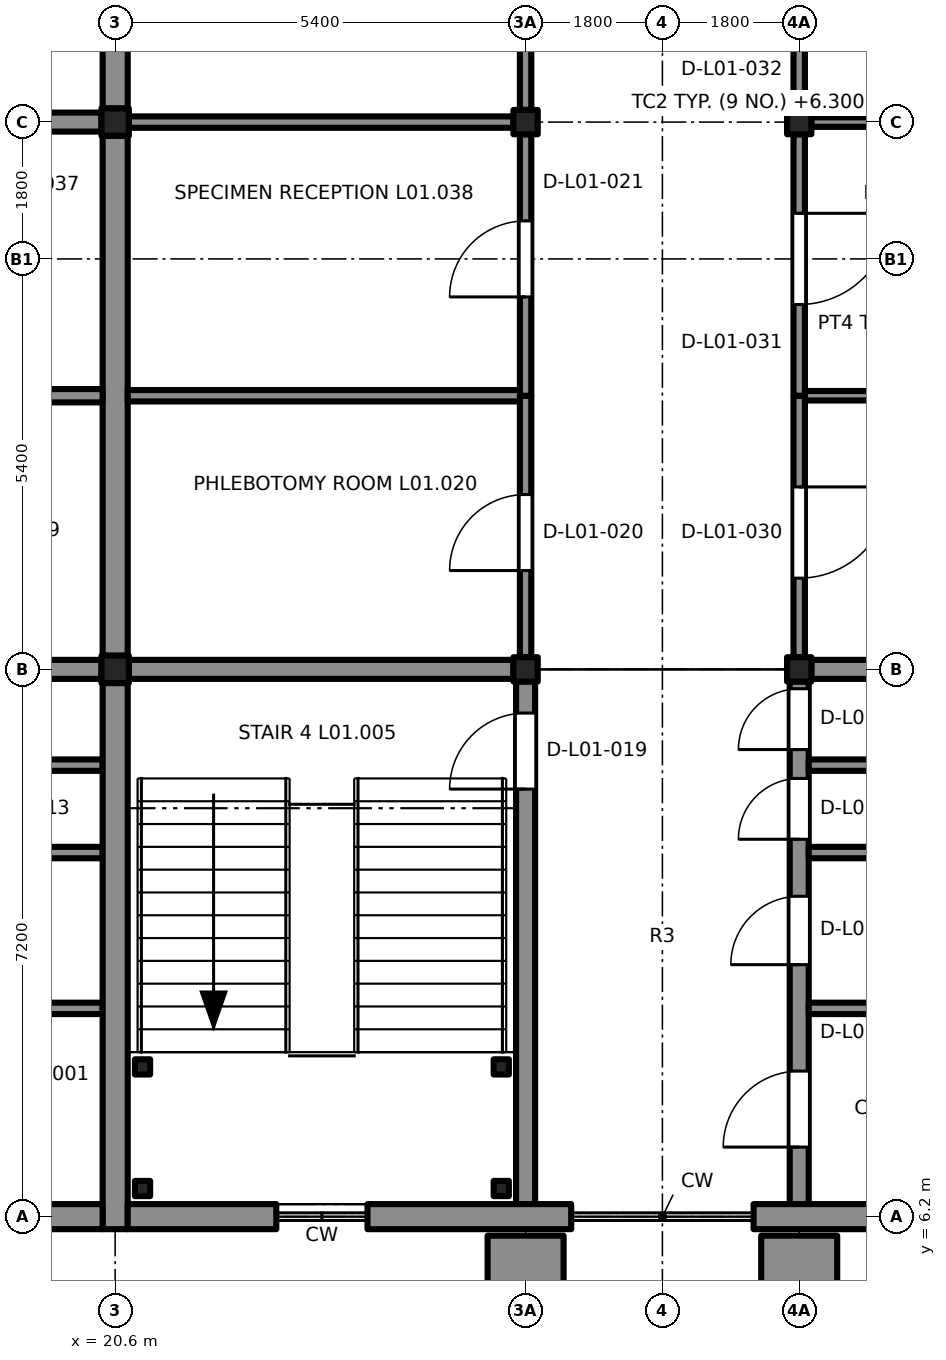
"""IFC4 building model, lengths in metres.
Left out: names, types, materials, properties, quantities, classifications, styles, units other than length and angle.
Written with IfcOpenShell. Run it as: python <this file> out.ifc"""

import sys

from ifc_helpers import new_model, si_unit, direction, frame, frame_2d, origin, origin_2d, place, context, subcontext, project, spatial, rectangle, extrude, element, fill, save


model = new_model("IFC4")
c1 = context("Model", 3, precision=1e-05, world=origin(), true_north=direction((0.0, 1.0)))
c2 = subcontext(c1, "Body", "Model", "MODEL_VIEW")
j1 = project(units=[si_unit("LENGTHUNIT", "METRE"), si_unit("PLANEANGLEUNIT", "RADIAN")], contexts=[c1])
p1 = place(None, origin())
s1 = spatial("IfcSite", under=j1, at=p1, CompositionType="ELEMENT")
p2 = place(p1, origin())
s2 = spatial("IfcBuilding", under=s1, at=p2, CompositionType="ELEMENT")
p3 = place(p2, frame((0.0, 0.0, 6.3)))
s3 = spatial("IfcBuildingStorey", under=s2, at=p3, CompositionType="ELEMENT", Elevation=6.3)
for number, where, z_axis, x_axis in (
    (1, (20.6, 13.4, 0.0), (0.0, 0.0, 1.0), (1.0, 0.0, 0.0)),
    (2, (20.6, 20.6, 0.0), (0.0, 0.0, 1.0), (1.0, 0.0, 0.0)),
):
    element("IfcColumn", number, at=place(p3, frame(where, z_axis=z_axis, x_axis=x_axis)), inside=s3, PredefinedType="COLUMN", context=c2, shape_type="SweptSolid", body=[
        extrude(rectangle(XDim=0.36, YDim=0.36, at=origin_2d()), origin(), (0.0, 0.0, 1.0), 3.9),
    ])
for number, where, z_axis, x_axis in (
    (3, (26.0, 13.4, 0.0), (0.0, 0.0, 1.0), (1.0, 0.0, 0.0)),
    (4, (29.6, 13.4, 0.0), (0.0, 0.0, 1.0), (1.0, 0.0, 0.0)),
    (5, (26.0, 20.6, 0.0), (0.0, 0.0, 1.0), (1.0, 0.0, 0.0)),
    (6, (29.6, 20.6, 0.0), (0.0, 0.0, 1.0), (1.0, 0.0, 0.0)),
):
    element("IfcColumn", number, at=place(p3, frame(where, z_axis=z_axis, x_axis=x_axis)), inside=s3, PredefinedType="COLUMN", context=c2, shape_type="SweptSolid", body=[
        extrude(rectangle(XDim=0.32, YDim=0.32, at=origin_2d()), origin(), (0.0, 0.0, 1.0), 3.9),
    ])
p4 = place(p3, frame((15.38, 13.4, 0.0), z_axis=(0.0, 0.0, 1.0), x_axis=(1.0, 0.0, 0.0)))
e7 = element("IfcWall", 7, at=p4, inside=s3, PredefinedType="SHEAR", context=c2, shape_type="SweptSolid", body=[
    extrude(rectangle(XDim=5.04, YDim=0.25, at=frame_2d((2.52, 0.0))), origin(), (0.0, 0.0, 1.0), 3.65),
])
for number, where, z_axis, x_axis in (
    (8, (15.325, 8.94, 0.0), (0.0, 0.0, 1.0), (1.0, 0.0, 0.0)),
    (9, (15.325, 10.99, 0.0), (0.0, 0.0, 1.0), (1.0, 0.0, 0.0)),
    (10, (15.325, 12.14, 0.0), (0.0, 0.0, 1.0), (1.0, 0.0, 0.0)),
):
    element("IfcWall", number, at=place(p3, frame(where, z_axis=z_axis, x_axis=x_axis)), inside=s3, PredefinedType="PARTITIONING", context=c2, shape_type="SweptSolid", body=[
        extrude(rectangle(XDim=5.11, YDim=0.15, at=frame_2d((2.555, 0.0))), origin(), (0.0, 0.0, 1.0), 3.65),
    ])
p5 = place(p3, frame((15.38, 20.6, 0.0), z_axis=(0.0, 0.0, 1.0), x_axis=(1.0, 0.0, 0.0)))
e11 = element("IfcWall", 11, at=p5, inside=s3, PredefinedType="SHEAR", context=c2, shape_type="SweptSolid", body=[
    extrude(rectangle(XDim=5.04, YDim=0.25, at=frame_2d((2.52, 0.0))), origin(), (0.0, 0.0, 1.0), 3.65),
])
p6 = place(p3, frame((26.0, 6.365, 0.0), z_axis=(0.0, 0.0, 1.0), x_axis=(0.0, 1.0, 0.0)))
e12 = element("IfcWall", 12, at=p6, inside=s3, PredefinedType="SHEAR", context=c2, shape_type="SweptSolid", body=[
    extrude(rectangle(XDim=6.875, YDim=0.25, at=frame_2d((3.438, 0.0))), origin(), (0.0, 0.0, 1.0), 3.65),
])
p7 = place(p6, frame((5.46, 0.0, 0.0)))
e13 = element("IfcOpeningElement", 13, at=p7, cuts=e12, PredefinedType="OPENING", context=c2, shape_type="SweptSolid", body=[
    extrude(rectangle(XDim=1.0, YDim=2.1, at=frame_2d((0.5, 1.05))), frame((0.0, 0.135, 0.0), z_axis=(0.0, -1.0, 0.0), x_axis=(1.0, 0.0, 0.0)), (0.0, 0.0, 1.0), 0.27),
])
p8 = place(p3, frame((20.78, 13.4, 0.0), z_axis=(0.0, 0.0, 1.0), x_axis=(1.0, 0.0, 0.0)))
e14 = element("IfcWall", 14, at=p8, inside=s3, PredefinedType="SHEAR", context=c2, shape_type="SweptSolid", body=[
    extrude(rectangle(XDim=5.06, YDim=0.25, at=frame_2d((2.53, 0.0))), origin(), (0.0, 0.0, 1.0), 3.65),
])
p9 = place(p3, frame((29.6, 6.365, 0.0), z_axis=(0.0, 0.0, 1.0), x_axis=(0.0, 1.0, 0.0)))
e15 = element("IfcWall", 15, at=p9, inside=s3, PredefinedType="SHEAR", context=c2, shape_type="SweptSolid", body=[
    extrude(rectangle(XDim=6.875, YDim=0.25, at=frame_2d((3.438, 0.0))), origin(), (0.0, 0.0, 1.0), 3.65),
])
p10 = place(p9, frame((0.75, 0.0, 0.0)))
e16 = element("IfcOpeningElement", 16, at=p10, cuts=e15, PredefinedType="OPENING", context=c2, shape_type="SweptSolid", body=[
    extrude(rectangle(XDim=1.0, YDim=2.1, at=frame_2d((0.5, 1.05))), frame((0.0, 0.135, 0.0), z_axis=(0.0, -1.0, 0.0), x_axis=(1.0, 0.0, 0.0)), (0.0, 0.0, 1.0), 0.27),
])
p11 = place(p9, frame((3.15, 0.0, 0.0)))
e17 = element("IfcOpeningElement", 17, at=p11, cuts=e15, PredefinedType="OPENING", context=c2, shape_type="SweptSolid", body=[
    extrude(rectangle(XDim=0.9, YDim=2.1, at=frame_2d((0.45, 1.05))), frame((0.0, 0.135, 0.0), z_axis=(0.0, -1.0, 0.0), x_axis=(1.0, 0.0, 0.0)), (0.0, 0.0, 1.0), 0.27),
])
p12 = place(p9, frame((4.8, 0.0, 0.0)))
e18 = element("IfcOpeningElement", 18, at=p12, cuts=e15, PredefinedType="OPENING", context=c2, shape_type="SweptSolid", body=[
    extrude(rectangle(XDim=0.8, YDim=2.1, at=frame_2d((0.4, 1.05))), frame((0.0, 0.135, 0.0), z_axis=(0.0, -1.0, 0.0), x_axis=(1.0, 0.0, 0.0)), (0.0, 0.0, 1.0), 0.27),
])
p13 = place(p9, frame((5.98, 0.0, 0.0)))
e19 = element("IfcOpeningElement", 19, at=p13, cuts=e15, PredefinedType="OPENING", context=c2, shape_type="SweptSolid", body=[
    extrude(rectangle(XDim=0.8, YDim=2.1, at=frame_2d((0.4, 1.05))), frame((0.0, 0.135, 0.0), z_axis=(0.0, -1.0, 0.0), x_axis=(1.0, 0.0, 0.0)), (0.0, 0.0, 1.0), 0.27),
])
p14 = place(p3, frame((29.76, 13.4, 0.0), z_axis=(0.0, 0.0, 1.0), x_axis=(1.0, 0.0, 0.0)))
e20 = element("IfcWall", 20, at=p14, inside=s3, PredefinedType="SHEAR", context=c2, shape_type="SweptSolid", body=[
    extrude(rectangle(XDim=5.08, YDim=0.25, at=frame_2d((2.54, 0.0))), origin(), (0.0, 0.0, 1.0), 3.65),
])
for number, where, z_axis, x_axis in (
    (21, (29.725, 8.94, 0.0), (0.0, 0.0, 1.0), (1.0, 0.0, 0.0)),
    (22, (29.725, 10.99, 0.0), (0.0, 0.0, 1.0), (1.0, 0.0, 0.0)),
    (23, (29.725, 12.14, 0.0), (0.0, 0.0, 1.0), (1.0, 0.0, 0.0)),
):
    element("IfcWall", number, at=place(p3, frame(where, z_axis=z_axis, x_axis=x_axis)), inside=s3, PredefinedType="PARTITIONING", context=c2, shape_type="SweptSolid", body=[
        extrude(rectangle(XDim=5.11, YDim=0.15, at=frame_2d((2.555, 0.0))), origin(), (0.0, 0.0, 1.0), 3.65),
    ])
for number, where, z_axis, x_axis in (
    (24, (20.96, 6.57, 0.0), (0.0, 0.0, 1.0), (1.0, 0.0, 0.0)),
    (25, (25.68, 6.57, 0.0), (0.0, 0.0, 1.0), (1.0, 0.0, 0.0)),
    (26, (20.96, 8.17, 0.0), (0.0, 0.0, 1.0), (1.0, 0.0, 0.0)),
    (27, (25.68, 8.17, 0.0), (0.0, 0.0, 1.0), (1.0, 0.0, 0.0)),
):
    element("IfcColumn", number, at=place(p3, frame(where, z_axis=z_axis, x_axis=x_axis)), inside=s3, PredefinedType="COLUMN", context=c2, shape_type="SweptSolid", body=[
        extrude(rectangle(XDim=0.2, YDim=0.2, at=origin_2d()), origin(), (0.0, 0.0, 1.0), 3.9),
    ])
p15 = place(p3, frame((20.6, 13.22, 0.0), z_axis=(0.0, 0.0, 1.0), x_axis=(0.0, -1.0, 0.0)))
e28 = element("IfcWall", 28, at=p15, inside=s3, PredefinedType="SOLIDWALL", context=c2, shape_type="SweptSolid", body=[
    extrude(rectangle(XDim=7.185, YDim=0.33, at=frame_2d((3.593, 0.0))), origin(), (0.0, 0.0, 1.0), 3.22),
])
p16 = place(p3, frame((20.6, 20.42, 0.0), z_axis=(0.0, 0.0, 1.0), x_axis=(0.0, -1.0, 0.0)))
e29 = element("IfcWall", 29, at=p16, inside=s3, PredefinedType="SOLIDWALL", context=c2, shape_type="SweptSolid", body=[
    extrude(rectangle(XDim=6.84, YDim=0.33, at=frame_2d((3.42, 0.0))), origin(), (0.0, 0.0, 1.0), 3.22),
])
p17 = place(p3, frame((20.6, 27.62, 0.0), z_axis=(0.0, 0.0, 1.0), x_axis=(0.0, -1.0, 0.0)))
e30 = element("IfcWall", 30, at=p17, inside=s3, PredefinedType="SOLIDWALL", context=c2, shape_type="SweptSolid", body=[
    extrude(rectangle(XDim=6.84, YDim=0.33, at=frame_2d((3.42, 0.0))), origin(), (0.0, 0.0, 1.0), 3.22),
])
p18 = place(p3, frame((20.435, 6.2, 0.0), z_axis=(0.0, 0.0, 1.0), x_axis=(-1.0, 0.0, 0.0)))
e31 = element("IfcWall", 31, at=p18, inside=s3, PredefinedType="SOLIDWALL", context=c2, shape_type="SweptSolid", body=[
    extrude(rectangle(XDim=5.835, YDim=0.33, at=frame_2d((2.917, 0.0))), origin(), (0.0, 0.0, 1.0), 3.2),
])
p19 = place(p3, frame((22.72, 6.2, 0.0), z_axis=(0.0, 0.0, 1.0), x_axis=(-1.0, 0.0, 0.0)))
e32 = element("IfcWall", 32, at=p19, inside=s3, PredefinedType="SOLIDWALL", context=c2, shape_type="SweptSolid", body=[
    extrude(rectangle(XDim=1.955, YDim=0.33, at=frame_2d((0.978, 0.0))), origin(), (0.0, 0.0, 1.0), 3.2),
])
p20 = place(p3, frame((26.6, 6.2, 0.0), z_axis=(0.0, 0.0, 1.0), x_axis=(-1.0, 0.0, 0.0)))
e33 = element("IfcWall", 33, at=p20, inside=s3, PredefinedType="SOLIDWALL", context=c2, shape_type="SweptSolid", body=[
    extrude(rectangle(XDim=2.68, YDim=0.33, at=frame_2d((1.34, 0.0))), origin(), (0.0, 0.0, 1.0), 3.2),
])
p21 = place(p3, frame((33.469, 6.2, 0.0), z_axis=(0.0, 0.0, 1.0), x_axis=(-1.0, 0.0, 0.0)))
e34 = element("IfcWall", 34, at=p21, inside=s3, PredefinedType="SOLIDWALL", context=c2, shape_type="SweptSolid", body=[
    extrude(rectangle(XDim=4.469, YDim=0.33, at=frame_2d((2.234, 0.0))), origin(), (0.0, 0.0, 1.0), 3.2),
])
for number, where, z_axis, x_axis in (
    (35, (26.5, 5.575, 0.0), (0.0, 0.0, 1.0), (-1.0, 0.0, 0.0)),
    (36, (30.1, 5.575, 0.0), (0.0, 0.0, 1.0), (-1.0, 0.0, 0.0)),
):
    element("IfcWall", number, at=place(p3, frame(where, z_axis=z_axis, x_axis=x_axis)), inside=s3, PredefinedType="SOLIDWALL", context=c2, shape_type="SweptSolid", body=[
        extrude(rectangle(XDim=1.0, YDim=0.75, at=frame_2d((0.5, 0.0))), origin(), (0.0, 0.0, 1.0), 3.9),
    ])
p22 = place(p3, frame((20.435, 17.0, 0.0), z_axis=(0.0, 0.0, 1.0), x_axis=(-1.0, 0.0, 0.0)))
e37 = element("IfcWall", 37, at=p22, inside=s3, PredefinedType="PARTITIONING", context=c2, shape_type="SweptSolid", body=[
    extrude(rectangle(XDim=5.147, YDim=0.175, at=frame_2d((2.574, 0.0))), origin(), (0.0, 0.0, 1.0), 3.38),
])
p23 = place(p3, frame((26.0, 13.56, 0.0), z_axis=(0.0, 0.0, 1.0), x_axis=(0.0, 1.0, 0.0)))
e38 = element("IfcWall", 38, at=p23, inside=s3, PredefinedType="PARTITIONING", context=c2, shape_type="SweptSolid", body=[
    extrude(rectangle(XDim=3.44, YDim=0.15, at=frame_2d((1.72, 0.0))), origin(), (0.0, 0.0, 1.0), 3.22),
])
p24 = place(p23, frame((1.14, 0.0, 0.0)))
e39 = element("IfcOpeningElement", 39, at=p24, cuts=e38, PredefinedType="OPENING", context=c2, shape_type="SweptSolid", body=[
    extrude(rectangle(XDim=1.0, YDim=2.1, at=frame_2d((0.5, 1.05))), frame((0.0, 0.085, 0.0), z_axis=(0.0, -1.0, 0.0), x_axis=(1.0, 0.0, 0.0)), (0.0, 0.0, 1.0), 0.17),
])
p25 = place(p3, frame((26.0, 17.0, 0.0), z_axis=(0.0, 0.0, 1.0), x_axis=(0.0, 1.0, 0.0)))
e40 = element("IfcWall", 40, at=p25, inside=s3, PredefinedType="PARTITIONING", context=c2, shape_type="SweptSolid", body=[
    extrude(rectangle(XDim=3.44, YDim=0.15, at=frame_2d((1.72, 0.0))), origin(), (0.0, 0.0, 1.0), 3.22),
])
p26 = place(p25, frame((1.3, 0.0, 0.0)))
e41 = element("IfcOpeningElement", 41, at=p26, cuts=e40, PredefinedType="OPENING", context=c2, shape_type="SweptSolid", body=[
    extrude(rectangle(XDim=1.0, YDim=2.1, at=frame_2d((0.5, 1.05))), frame((0.0, 0.085, 0.0), z_axis=(0.0, -1.0, 0.0), x_axis=(1.0, 0.0, 0.0)), (0.0, 0.0, 1.0), 0.17),
])
p27 = place(p3, frame((20.765, 17.0, 0.0), z_axis=(0.0, 0.0, 1.0), x_axis=(1.0, 0.0, 0.0)))
e42 = element("IfcWall", 42, at=p27, inside=s3, PredefinedType="PARTITIONING", context=c2, shape_type="SweptSolid", body=[
    extrude(rectangle(XDim=5.16, YDim=0.15, at=frame_2d((2.58, 0.0))), origin(), (0.0, 0.0, 1.0), 3.38),
])
p28 = place(p3, frame((26.0, 20.76, 0.0), z_axis=(0.0, 0.0, 1.0), x_axis=(0.0, 1.0, 0.0)))
e43 = element("IfcWall", 43, at=p28, inside=s3, PredefinedType="PARTITIONING", context=c2, shape_type="SweptSolid", body=[
    extrude(rectangle(XDim=6.88, YDim=0.15, at=frame_2d((3.44, 0.0))), origin(), (0.0, 0.0, 1.0), 3.22),
])
p29 = place(p28, frame((1.14, 0.0, 0.0)))
e44 = element("IfcOpeningElement", 44, at=p29, cuts=e43, PredefinedType="OPENING", context=c2, shape_type="SweptSolid", body=[
    extrude(rectangle(XDim=1.0, YDim=2.1, at=frame_2d((0.5, 1.05))), frame((0.0, 0.085, 0.0), z_axis=(0.0, -1.0, 0.0), x_axis=(1.0, 0.0, 0.0)), (0.0, 0.0, 1.0), 0.17),
])
p30 = place(p3, frame((20.78, 20.6, 0.0), z_axis=(0.0, 0.0, 1.0), x_axis=(1.0, 0.0, 0.0)))
e45 = element("IfcWall", 45, at=p30, inside=s3, PredefinedType="PARTITIONING", context=c2, shape_type="SweptSolid", body=[
    extrude(rectangle(XDim=5.06, YDim=0.15, at=frame_2d((2.53, 0.0))), origin(), (0.0, 0.0, 1.0), 3.38),
])
p31 = place(p3, frame((29.6, 17.0, 0.0), z_axis=(0.0, 0.0, 1.0), x_axis=(0.0, -1.0, 0.0)))
e46 = element("IfcWall", 46, at=p31, inside=s3, PredefinedType="PARTITIONING", context=c2, shape_type="SweptSolid", body=[
    extrude(rectangle(XDim=3.44, YDim=0.15, at=frame_2d((1.72, 0.0))), origin(), (0.0, 0.0, 1.0), 3.22),
])
p32 = place(p31, frame((1.2, 0.0, 0.0)))
e47 = element("IfcOpeningElement", 47, at=p32, cuts=e46, PredefinedType="OPENING", context=c2, shape_type="SweptSolid", body=[
    extrude(rectangle(XDim=1.2, YDim=2.1, at=frame_2d((0.6, 1.05))), frame((0.0, 0.085, 0.0), z_axis=(0.0, -1.0, 0.0), x_axis=(1.0, 0.0, 0.0)), (0.0, 0.0, 1.0), 0.17),
])
p33 = place(p3, frame((29.6, 20.44, 0.0), z_axis=(0.0, 0.0, 1.0), x_axis=(0.0, -1.0, 0.0)))
e48 = element("IfcWall", 48, at=p33, inside=s3, PredefinedType="PARTITIONING", context=c2, shape_type="SweptSolid", body=[
    extrude(rectangle(XDim=3.44, YDim=0.15, at=frame_2d((1.72, 0.0))), origin(), (0.0, 0.0, 1.0), 3.22),
])
p34 = place(p33, frame((1.04, 0.0, 0.0)))
e49 = element("IfcOpeningElement", 49, at=p34, cuts=e48, PredefinedType="OPENING", context=c2, shape_type="SweptSolid", body=[
    extrude(rectangle(XDim=1.2, YDim=2.1, at=frame_2d((0.6, 1.05))), frame((0.0, 0.085, 0.0), z_axis=(0.0, -1.0, 0.0), x_axis=(1.0, 0.0, 0.0)), (0.0, 0.0, 1.0), 0.17),
])
p35 = place(p3, frame((34.835, 17.0, 0.0), z_axis=(0.0, 0.0, 1.0), x_axis=(-1.0, 0.0, 0.0)))
e50 = element("IfcWall", 50, at=p35, inside=s3, PredefinedType="PARTITIONING", context=c2, shape_type="SweptSolid", body=[
    extrude(rectangle(XDim=5.16, YDim=0.125, at=frame_2d((2.58, 0.0))), origin(), (0.0, 0.0, 1.0), 3.38),
])
p36 = place(p3, frame((29.6, 27.64, 0.0), z_axis=(0.0, 0.0, 1.0), x_axis=(0.0, -1.0, 0.0)))
e51 = element("IfcWall", 51, at=p36, inside=s3, PredefinedType="PARTITIONING", context=c2, shape_type="SweptSolid", body=[
    extrude(rectangle(XDim=6.88, YDim=0.15, at=frame_2d((3.44, 0.0))), origin(), (0.0, 0.0, 1.0), 3.22),
])
p37 = place(p36, frame((4.64, 0.0, 0.0)))
e52 = element("IfcOpeningElement", 52, at=p37, cuts=e51, PredefinedType="OPENING", context=c2, shape_type="SweptSolid", body=[
    extrude(rectangle(XDim=1.2, YDim=2.1, at=frame_2d((0.6, 1.05))), frame((0.0, 0.085, 0.0), z_axis=(0.0, -1.0, 0.0), x_axis=(1.0, 0.0, 0.0)), (0.0, 0.0, 1.0), 0.17),
])
p38 = place(p3, frame((34.835, 20.6, 0.0), z_axis=(0.0, 0.0, 1.0), x_axis=(-1.0, 0.0, 0.0)))
e53 = element("IfcWall", 53, at=p38, inside=s3, PredefinedType="PARTITIONING", context=c2, shape_type="SweptSolid", body=[
    extrude(rectangle(XDim=5.075, YDim=0.125, at=frame_2d((2.538, 0.0))), origin(), (0.0, 0.0, 1.0), 3.38),
])
p39 = place(p7, origin())
e54 = element("IfcDoor", 54, at=p39, inside=s3, OperationType="SINGLE_SWING_RIGHT", PredefinedType="DOOR", context=c2, shape_type="SweptSolid", body=[
    extrude(rectangle(XDim=1.0, YDim=2.1, at=frame_2d((0.5, 1.05))), frame((0.0, 0.025, 0.0), z_axis=(0.0, -1.0, 0.0), x_axis=(1.0, 0.0, 0.0)), (0.0, 0.0, 1.0), 0.05),
])
fill(e13, e54)
p40 = place(p10, origin())
e55 = element("IfcDoor", 55, at=p40, inside=s3, OperationType="SINGLE_SWING_LEFT", PredefinedType="DOOR", context=c2, shape_type="SweptSolid", body=[
    extrude(rectangle(XDim=1.0, YDim=2.1, at=frame_2d((0.5, 1.05))), frame((0.0, 0.025, 0.0), z_axis=(0.0, -1.0, 0.0), x_axis=(1.0, 0.0, 0.0)), (0.0, 0.0, 1.0), 0.05),
])
fill(e16, e55)
p41 = place(p11, origin())
e56 = element("IfcDoor", 56, at=p41, inside=s3, OperationType="SINGLE_SWING_LEFT", PredefinedType="DOOR", context=c2, shape_type="SweptSolid", body=[
    extrude(rectangle(XDim=0.9, YDim=2.1, at=frame_2d((0.45, 1.05))), frame((0.0, 0.025, 0.0), z_axis=(0.0, -1.0, 0.0), x_axis=(1.0, 0.0, 0.0)), (0.0, 0.0, 1.0), 0.05),
])
fill(e17, e56)
p42 = place(p12, origin())
e57 = element("IfcDoor", 57, at=p42, inside=s3, OperationType="SINGLE_SWING_LEFT", PredefinedType="DOOR", context=c2, shape_type="SweptSolid", body=[
    extrude(rectangle(XDim=0.8, YDim=2.1, at=frame_2d((0.4, 1.05))), frame((0.0, 0.025, 0.0), z_axis=(0.0, -1.0, 0.0), x_axis=(1.0, 0.0, 0.0)), (0.0, 0.0, 1.0), 0.05),
])
fill(e18, e57)
p43 = place(p13, origin())
e58 = element("IfcDoor", 58, at=p43, inside=s3, OperationType="SINGLE_SWING_LEFT", PredefinedType="DOOR", context=c2, shape_type="SweptSolid", body=[
    extrude(rectangle(XDim=0.8, YDim=2.1, at=frame_2d((0.4, 1.05))), frame((0.0, 0.025, 0.0), z_axis=(0.0, -1.0, 0.0), x_axis=(1.0, 0.0, 0.0)), (0.0, 0.0, 1.0), 0.05),
])
fill(e19, e58)
p44 = place(p24, origin())
e59 = element("IfcDoor", 59, at=p44, inside=s3, OperationType="SINGLE_SWING_LEFT", PredefinedType="DOOR", context=c2, shape_type="SweptSolid", body=[
    extrude(rectangle(XDim=1.0, YDim=2.1, at=frame_2d((0.5, 1.05))), frame((0.0, 0.025, 0.0), z_axis=(0.0, -1.0, 0.0), x_axis=(1.0, 0.0, 0.0)), (0.0, 0.0, 1.0), 0.05),
])
fill(e39, e59)
p45 = place(p26, origin())
e60 = element("IfcDoor", 60, at=p45, inside=s3, OperationType="SINGLE_SWING_RIGHT", PredefinedType="DOOR", context=c2, shape_type="SweptSolid", body=[
    extrude(rectangle(XDim=1.0, YDim=2.1, at=frame_2d((0.5, 1.05))), frame((0.0, 0.025, 0.0), z_axis=(0.0, -1.0, 0.0), x_axis=(1.0, 0.0, 0.0)), (0.0, 0.0, 1.0), 0.05),
])
fill(e41, e60)
p46 = place(p32, origin())
e61 = element("IfcDoor", 61, at=p46, inside=s3, OperationType="SINGLE_SWING_RIGHT", PredefinedType="DOOR", context=c2, shape_type="SweptSolid", body=[
    extrude(rectangle(XDim=1.2, YDim=2.1, at=frame_2d((0.6, 1.05))), frame((0.0, 0.025, 0.0), z_axis=(0.0, -1.0, 0.0), x_axis=(1.0, 0.0, 0.0)), (0.0, 0.0, 1.0), 0.05),
])
fill(e47, e61)
p47 = place(p34, origin())
e62 = element("IfcDoor", 62, at=p47, inside=s3, OperationType="SINGLE_SWING_LEFT", PredefinedType="DOOR", context=c2, shape_type="SweptSolid", body=[
    extrude(rectangle(XDim=1.2, YDim=2.1, at=frame_2d((0.6, 1.05))), frame((0.0, 0.025, 0.0), z_axis=(0.0, -1.0, 0.0), x_axis=(1.0, 0.0, 0.0)), (0.0, 0.0, 1.0), 0.05),
])
fill(e49, e62)
save(model, sys.argv[1])
